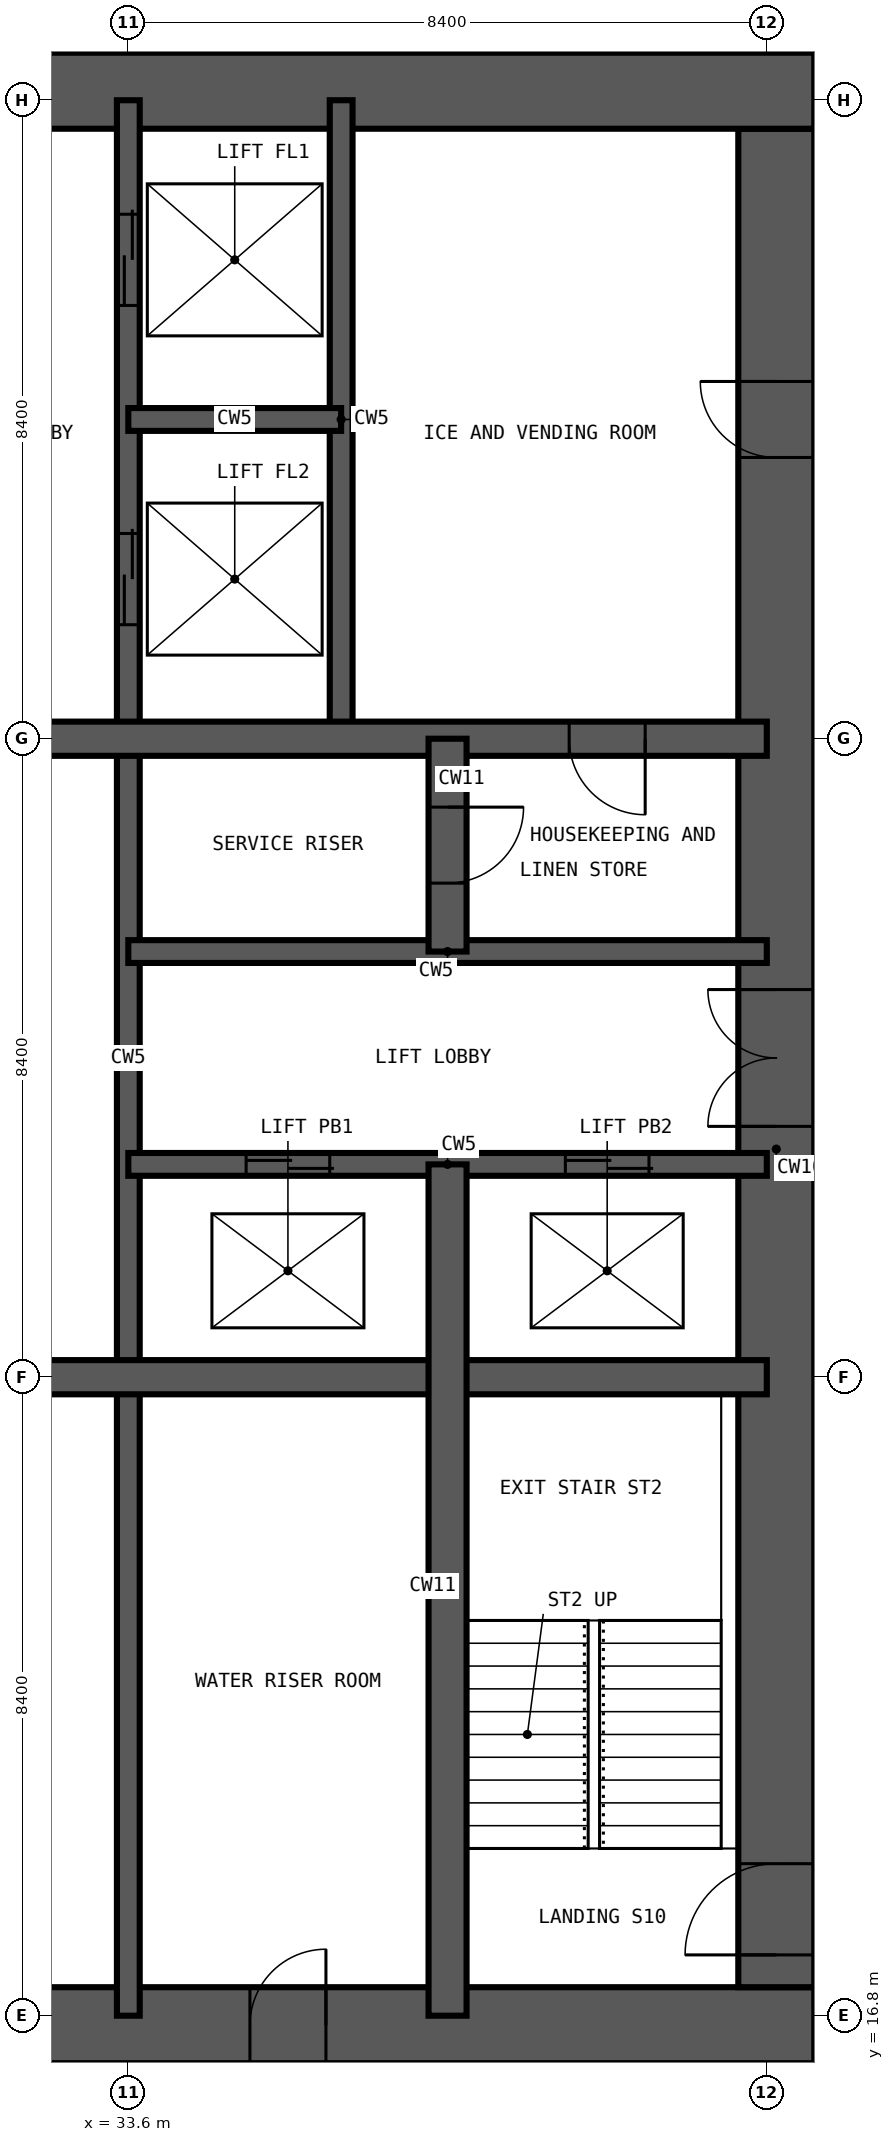
"""IFC4 building model, lengths in metres.
Left out: names, types, materials, properties, quantities, classifications, styles, units other than length and angle.
Written with IfcOpenShell. Run it as: python <this file> out.ifc"""

import sys

from ifc_helpers import new_model, si_unit, direction, frame, frame_2d, origin, place, context, subcontext, project, spatial, rectangle, extrude, element, fill, save


model = new_model("IFC4")
c1 = context("Model", 3, precision=1e-05, world=origin(), true_north=direction((0.0, 1.0)))
c2 = subcontext(c1, "Body", "Model", "MODEL_VIEW")
j1 = project(units=[si_unit("LENGTHUNIT", "METRE"), si_unit("PLANEANGLEUNIT", "RADIAN")], contexts=[c1])
p1 = place(None, origin())
s1 = spatial("IfcSite", under=j1, at=p1, CompositionType="ELEMENT")
p2 = place(p1, origin())
s2 = spatial("IfcBuilding", under=s1, at=p2, CompositionType="ELEMENT")
p3 = place(p2, frame((0.0, 0.0, 133.2)))
s3 = spatial("IfcBuildingStorey", under=s2, at=p3, CompositionType="ELEMENT", Elevation=133.2)
p4 = place(p3, frame((16.175, 16.675, -0.35), z_axis=(0.0, 0.0, 1.0), x_axis=(1.0, 0.0, 0.0)))
e1 = element("IfcWall", 1, at=p4, inside=s3, PredefinedType="SHEAR", context=c2, shape_type="SweptSolid", body=[
    extrude(rectangle(XDim=26.45, YDim=1.0, at=frame_2d((13.225, 0.0))), origin(), (0.0, 0.0, 1.0), 3.6),
])
p5 = place(p4, frame((12.725, 0.0, 0.35)))
e2 = element("IfcOpeningElement", 2, at=p5, cuts=e1, PredefinedType="OPENING", context=c2, shape_type="SweptSolid", body=[
    extrude(rectangle(XDim=1.0, YDim=2.1, at=frame_2d((0.5, 1.05))), frame((0.0, 0.51, 0.0), z_axis=(0.0, -1.0, 0.0), x_axis=(1.0, 0.0, 0.0)), (0.0, 0.0, 1.0), 1.02),
])
p6 = place(p4, frame((19.025, 0.0, 0.35)))
e3 = element("IfcOpeningElement", 3, at=p6, cuts=e1, PredefinedType="OPENING", context=c2, shape_type="SweptSolid", body=[
    extrude(rectangle(XDim=1.0, YDim=2.1, at=frame_2d((0.5, 1.05))), frame((0.0, 0.51, 0.0), z_axis=(0.0, -1.0, 0.0), x_axis=(1.0, 0.0, 0.0)), (0.0, 0.0, 1.0), 1.02),
])
p7 = place(p3, frame((42.125, 17.175, -0.35), z_axis=(0.0, 0.0, 1.0), x_axis=(0.0, 1.0, 0.0)))
e4 = element("IfcWall", 4, at=p7, inside=s3, PredefinedType="SHEAR", context=c2, shape_type="SweptSolid", body=[
    extrude(rectangle(XDim=24.45, YDim=1.0, at=frame_2d((12.225, 0.0))), origin(), (0.0, 0.0, 1.0), 3.6),
])
p8 = place(p7, frame((0.425, 0.0, 0.35)))
e5 = element("IfcOpeningElement", 5, at=p8, cuts=e4, PredefinedType="OPENING", context=c2, shape_type="SweptSolid", body=[
    extrude(rectangle(XDim=1.2, YDim=2.2, at=frame_2d((0.6, 1.1))), frame((0.0, 0.51, 0.0), z_axis=(0.0, -1.0, 0.0), x_axis=(1.0, 0.0, 0.0)), (0.0, 0.0, 1.0), 1.02),
])
p9 = place(p7, frame((11.325, 0.0, 0.35)))
e6 = element("IfcOpeningElement", 6, at=p9, cuts=e4, PredefinedType="OPENING", context=c2, shape_type="SweptSolid", body=[
    extrude(rectangle(XDim=1.8, YDim=2.2, at=frame_2d((0.9, 1.1))), frame((0.0, 0.51, 0.0), z_axis=(0.0, -1.0, 0.0), x_axis=(1.0, 0.0, 0.0)), (0.0, 0.0, 1.0), 1.02),
])
p10 = place(p7, frame((20.125, 0.0, 0.35)))
e7 = element("IfcOpeningElement", 7, at=p10, cuts=e4, PredefinedType="OPENING", context=c2, shape_type="SweptSolid", body=[
    extrude(rectangle(XDim=1.0, YDim=2.1, at=frame_2d((0.5, 1.05))), frame((0.0, 0.51, 0.0), z_axis=(0.0, -1.0, 0.0), x_axis=(1.0, 0.0, 0.0)), (0.0, 0.0, 1.0), 1.02),
])
p11 = place(p3, frame((42.625, 42.125, -0.35), z_axis=(0.0, 0.0, 1.0), x_axis=(-1.0, 0.0, 0.0)))
e8 = element("IfcWall", 8, at=p11, inside=s3, PredefinedType="SHEAR", context=c2, shape_type="SweptSolid", body=[
    extrude(rectangle(XDim=26.45, YDim=1.0, at=frame_2d((13.225, 0.0))), origin(), (0.0, 0.0, 1.0), 3.6),
])
p12 = place(p11, frame((21.125, 0.0, 0.35)))
e9 = element("IfcOpeningElement", 9, at=p12, cuts=e8, PredefinedType="OPENING", context=c2, shape_type="SweptSolid", body=[
    extrude(rectangle(XDim=1.0, YDim=2.1, at=frame_2d((0.5, 1.05))), frame((0.0, 0.51, 0.0), z_axis=(0.0, -1.0, 0.0), x_axis=(1.0, 0.0, 0.0)), (0.0, 0.0, 1.0), 1.02),
])
p13 = place(p11, frame((10.525, 0.0, 0.35)))
e10 = element("IfcOpeningElement", 10, at=p13, cuts=e8, PredefinedType="OPENING", context=c2, shape_type="SweptSolid", body=[
    extrude(rectangle(XDim=1.2, YDim=2.2, at=frame_2d((0.6, 1.1))), frame((0.0, 0.51, 0.0), z_axis=(0.0, -1.0, 0.0), x_axis=(1.0, 0.0, 0.0)), (0.0, 0.0, 1.0), 1.02),
])
p14 = place(p3, frame((33.6, 16.8, -0.35), z_axis=(0.0, 0.0, 1.0), x_axis=(0.0, 1.0, 0.0)))
e11 = element("IfcWall", 11, at=p14, inside=s3, PredefinedType="SHEAR", context=c2, shape_type="SweptSolid", body=[
    extrude(rectangle(XDim=25.2, YDim=0.3, at=frame_2d((12.6, 0.0))), origin(), (0.0, 0.0, 1.0), 3.6),
])
p15 = place(p14, frame((22.5, 0.0, 0.35)))
e12 = element("IfcOpeningElement", 12, at=p15, cuts=e11, PredefinedType="OPENING", context=c2, shape_type="SweptSolid", body=[
    extrude(rectangle(XDim=1.2, YDim=2.2, at=frame_2d((0.6, 1.1))), frame((0.0, 0.16, 0.0), z_axis=(0.0, -1.0, 0.0), x_axis=(1.0, 0.0, 0.0)), (0.0, 0.0, 1.0), 0.32),
])
p16 = place(p14, frame((18.3, 0.0, 0.35)))
e13 = element("IfcOpeningElement", 13, at=p16, cuts=e11, PredefinedType="OPENING", context=c2, shape_type="SweptSolid", body=[
    extrude(rectangle(XDim=1.2, YDim=2.2, at=frame_2d((0.6, 1.1))), frame((0.0, 0.16, 0.0), z_axis=(0.0, -1.0, 0.0), x_axis=(1.0, 0.0, 0.0)), (0.0, 0.0, 1.0), 0.32),
])
p17 = place(p3, frame((36.4, 33.6, -0.35), z_axis=(0.0, 0.0, 1.0), x_axis=(0.0, 1.0, 0.0)))
e14 = element("IfcWall", 14, at=p17, inside=s3, PredefinedType="SHEAR", context=c2, shape_type="SweptSolid", body=[
    extrude(rectangle(XDim=8.4, YDim=0.3, at=frame_2d((4.2, 0.0))), origin(), (0.0, 0.0, 1.0), 3.6),
])
p18 = place(p3, frame((33.6, 28.0, -0.35), z_axis=(0.0, 0.0, 1.0), x_axis=(1.0, 0.0, 0.0)))
e15 = element("IfcWall", 15, at=p18, inside=s3, PredefinedType="SHEAR", context=c2, shape_type="SweptSolid", body=[
    extrude(rectangle(XDim=8.4, YDim=0.3, at=frame_2d((4.2, 0.0))), origin(), (0.0, 0.0, 1.0), 3.6),
])
p19 = place(p18, frame((1.55, 0.0, 0.35)))
e16 = element("IfcOpeningElement", 16, at=p19, cuts=e15, PredefinedType="OPENING", context=c2, shape_type="SweptSolid", body=[
    extrude(rectangle(XDim=1.1, YDim=2.2, at=frame_2d((0.55, 1.1))), frame((0.0, 0.16, 0.0), z_axis=(0.0, -1.0, 0.0), x_axis=(1.0, 0.0, 0.0)), (0.0, 0.0, 1.0), 0.32),
])
p20 = place(p18, frame((5.75, 0.0, 0.35)))
e17 = element("IfcOpeningElement", 17, at=p20, cuts=e15, PredefinedType="OPENING", context=c2, shape_type="SweptSolid", body=[
    extrude(rectangle(XDim=1.1, YDim=2.2, at=frame_2d((0.55, 1.1))), frame((0.0, 0.16, 0.0), z_axis=(0.0, -1.0, 0.0), x_axis=(1.0, 0.0, 0.0)), (0.0, 0.0, 1.0), 0.32),
])
p21 = place(p3, frame((33.6, 30.8, -0.35), z_axis=(0.0, 0.0, 1.0), x_axis=(1.0, 0.0, 0.0)))
e18 = element("IfcWall", 18, at=p21, inside=s3, PredefinedType="SHEAR", context=c2, shape_type="SweptSolid", body=[
    extrude(rectangle(XDim=8.4, YDim=0.3, at=frame_2d((4.2, 0.0))), origin(), (0.0, 0.0, 1.0), 3.6),
])
p22 = place(p3, frame((33.6, 37.8, -0.35), z_axis=(0.0, 0.0, 1.0), x_axis=(1.0, 0.0, 0.0)))
e19 = element("IfcWall", 19, at=p22, inside=s3, PredefinedType="SHEAR", context=c2, shape_type="SweptSolid", body=[
    extrude(rectangle(XDim=2.8, YDim=0.3, at=frame_2d((1.4, 0.0))), origin(), (0.0, 0.0, 1.0), 3.6),
])
p23 = place(p3, frame((16.8, 25.2, -0.35), z_axis=(0.0, 0.0, 1.0), x_axis=(1.0, 0.0, 0.0)))
e20 = element("IfcWall", 20, at=p23, inside=s3, PredefinedType="SHEAR", context=c2, shape_type="SweptSolid", body=[
    extrude(rectangle(XDim=25.2, YDim=0.45, at=frame_2d((12.6, 0.0))), origin(), (0.0, 0.0, 1.0), 3.6),
])
p24 = place(p3, frame((16.8, 33.6, -0.35), z_axis=(0.0, 0.0, 1.0), x_axis=(1.0, 0.0, 0.0)))
e21 = element("IfcWall", 21, at=p24, inside=s3, PredefinedType="SHEAR", context=c2, shape_type="SweptSolid", body=[
    extrude(rectangle(XDim=25.2, YDim=0.45, at=frame_2d((12.6, 0.0))), origin(), (0.0, 0.0, 1.0), 3.6),
])
p25 = place(p24, frame((22.6, 0.0, 0.35)))
e22 = element("IfcOpeningElement", 22, at=p25, cuts=e21, PredefinedType="OPENING", context=c2, shape_type="SweptSolid", body=[
    extrude(rectangle(XDim=1.0, YDim=2.1, at=frame_2d((0.5, 1.05))), frame((0.0, 0.235, 0.0), z_axis=(0.0, -1.0, 0.0), x_axis=(1.0, 0.0, 0.0)), (0.0, 0.0, 1.0), 0.47),
])
p26 = place(p3, frame((37.8, 16.8, -0.35), z_axis=(0.0, 0.0, 1.0), x_axis=(0.0, 1.0, 0.0)))
e23 = element("IfcWall", 23, at=p26, inside=s3, PredefinedType="SHEAR", context=c2, shape_type="SweptSolid", body=[
    extrude(rectangle(XDim=11.2, YDim=0.5, at=frame_2d((5.6, 0.0))), origin(), (0.0, 0.0, 1.0), 3.6),
])
p27 = place(p3, frame((37.8, 30.8, -0.35), z_axis=(0.0, 0.0, 1.0), x_axis=(0.0, 1.0, 0.0)))
e24 = element("IfcWall", 24, at=p27, inside=s3, PredefinedType="SHEAR", context=c2, shape_type="SweptSolid", body=[
    extrude(rectangle(XDim=2.8, YDim=0.5, at=frame_2d((1.4, 0.0))), origin(), (0.0, 0.0, 1.0), 3.6),
])
p28 = place(p27, frame((0.9, 0.0, 0.35)))
e25 = element("IfcOpeningElement", 25, at=p28, cuts=e24, PredefinedType="OPENING", context=c2, shape_type="SweptSolid", body=[
    extrude(rectangle(XDim=1.0, YDim=2.1, at=frame_2d((0.5, 1.05))), frame((0.0, 0.26, 0.0), z_axis=(0.0, -1.0, 0.0), x_axis=(1.0, 0.0, 0.0)), (0.0, 0.0, 1.0), 0.52),
])
p29 = place(p8, origin())
e26 = element("IfcDoor", 26, at=p29, inside=s3, OperationType="SINGLE_SWING_LEFT", PredefinedType="DOOR", context=c2, shape_type="SweptSolid", body=[
    extrude(rectangle(XDim=1.2, YDim=2.2, at=frame_2d((0.6, 1.1))), frame((0.0, 0.025, 0.0), z_axis=(0.0, -1.0, 0.0), x_axis=(1.0, 0.0, 0.0)), (0.0, 0.0, 1.0), 0.05),
])
fill(e5, e26)
p30 = place(p19, origin())
e27 = element("IfcDoor", 27, at=p30, inside=s3, OperationType="DOUBLE_DOOR_SLIDING", PredefinedType="DOOR", context=c2, shape_type="SweptSolid", body=[
    extrude(rectangle(XDim=1.1, YDim=2.2, at=frame_2d((0.55, 1.1))), frame((0.0, 0.025, 0.0), z_axis=(0.0, -1.0, 0.0), x_axis=(1.0, 0.0, 0.0)), (0.0, 0.0, 1.0), 0.05),
])
fill(e16, e27)
p31 = place(p20, origin())
e28 = element("IfcDoor", 28, at=p31, inside=s3, OperationType="DOUBLE_DOOR_SLIDING", PredefinedType="DOOR", context=c2, shape_type="SweptSolid", body=[
    extrude(rectangle(XDim=1.1, YDim=2.2, at=frame_2d((0.55, 1.1))), frame((0.0, 0.025, 0.0), z_axis=(0.0, -1.0, 0.0), x_axis=(1.0, 0.0, 0.0)), (0.0, 0.0, 1.0), 0.05),
])
fill(e17, e28)
p32 = place(p15, origin())
e29 = element("IfcDoor", 29, at=p32, inside=s3, OperationType="DOUBLE_DOOR_SLIDING", PredefinedType="DOOR", context=c2, shape_type="SweptSolid", body=[
    extrude(rectangle(XDim=1.2, YDim=2.2, at=frame_2d((0.6, 1.1))), frame((0.0, 0.025, 0.0), z_axis=(0.0, -1.0, 0.0), x_axis=(1.0, 0.0, 0.0)), (0.0, 0.0, 1.0), 0.05),
])
fill(e12, e29)
p33 = place(p16, origin())
e30 = element("IfcDoor", 30, at=p33, inside=s3, OperationType="DOUBLE_DOOR_SLIDING", PredefinedType="DOOR", context=c2, shape_type="SweptSolid", body=[
    extrude(rectangle(XDim=1.2, YDim=2.2, at=frame_2d((0.6, 1.1))), frame((0.0, 0.025, 0.0), z_axis=(0.0, -1.0, 0.0), x_axis=(1.0, 0.0, 0.0)), (0.0, 0.0, 1.0), 0.05),
])
fill(e13, e30)
p34 = place(p28, frame((1.0, 0.0, 0.0), z_axis=(0.0, 0.0, 1.0), x_axis=(-1.0, 0.0, 0.0)))
e31 = element("IfcDoor", 31, at=p34, inside=s3, OperationType="SINGLE_SWING_LEFT", PredefinedType="DOOR", context=c2, shape_type="SweptSolid", body=[
    extrude(rectangle(XDim=1.0, YDim=2.1, at=frame_2d((0.5, 1.05))), frame((0.0, 0.025, 0.0), z_axis=(0.0, -1.0, 0.0), x_axis=(1.0, 0.0, 0.0)), (0.0, 0.0, 1.0), 0.05),
])
fill(e25, e31)
p35 = place(p25, frame((1.0, 0.0, 0.0), z_axis=(0.0, 0.0, 1.0), x_axis=(-1.0, 0.0, 0.0)))
e32 = element("IfcDoor", 32, at=p35, inside=s3, OperationType="SINGLE_SWING_LEFT", PredefinedType="DOOR", context=c2, shape_type="SweptSolid", body=[
    extrude(rectangle(XDim=1.0, YDim=2.1, at=frame_2d((0.5, 1.05))), frame((0.0, 0.025, 0.0), z_axis=(0.0, -1.0, 0.0), x_axis=(1.0, 0.0, 0.0)), (0.0, 0.0, 1.0), 0.05),
])
fill(e22, e32)
p36 = place(p9, origin())
e33 = element("IfcDoor", 33, at=p36, inside=s3, OperationType="DOUBLE_DOOR_DOUBLE_SWING", PredefinedType="DOOR", context=c2, shape_type="SweptSolid", body=[
    extrude(rectangle(XDim=1.8, YDim=2.2, at=frame_2d((0.9, 1.1))), frame((0.0, 0.025, 0.0), z_axis=(0.0, -1.0, 0.0), x_axis=(1.0, 0.0, 0.0)), (0.0, 0.0, 1.0), 0.05),
])
fill(e6, e33)
p37 = place(p10, origin())
e34 = element("IfcDoor", 34, at=p37, inside=s3, OperationType="SINGLE_SWING_RIGHT", PredefinedType="DOOR", context=c2, shape_type="SweptSolid", body=[
    extrude(rectangle(XDim=1.0, YDim=2.1, at=frame_2d((0.5, 1.05))), frame((0.0, 0.025, 0.0), z_axis=(0.0, -1.0, 0.0), x_axis=(1.0, 0.0, 0.0)), (0.0, 0.0, 1.0), 0.05),
])
fill(e7, e34)
p38 = place(p6, origin())
e35 = element("IfcDoor", 35, at=p38, inside=s3, OperationType="SINGLE_SWING_RIGHT", PredefinedType="DOOR", context=c2, shape_type="SweptSolid", body=[
    extrude(rectangle(XDim=1.0, YDim=2.1, at=frame_2d((0.5, 1.05))), frame((0.0, 0.025, 0.0), z_axis=(0.0, -1.0, 0.0), x_axis=(1.0, 0.0, 0.0)), (0.0, 0.0, 1.0), 0.05),
])
fill(e3, e35)
save(model, sys.argv[1])
